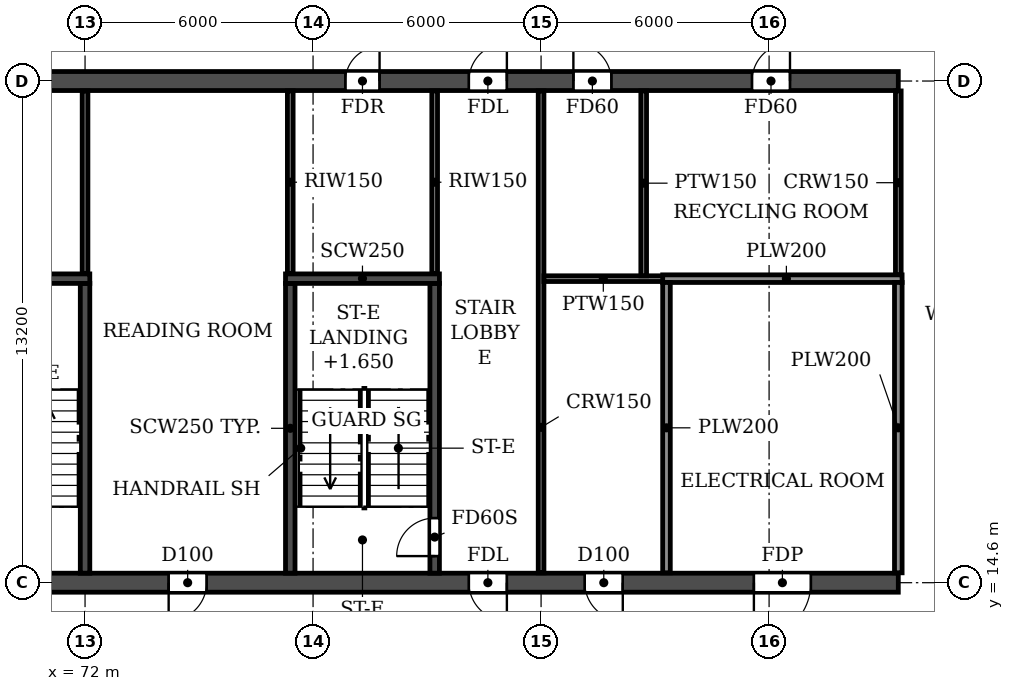
"""IFC4 building model, lengths in metres.
Left out: names, types, materials, properties, quantities, classifications, styles, units other than length and angle.
Written with IfcOpenShell. Run it as: python <this file> out.ifc"""

import sys

from ifc_helpers import new_model, si_unit, direction, frame, frame_2d, origin, place, context, subcontext, project, spatial, rectangle, extrude, element, fill, save


model = new_model("IFC4")
c1 = context("Model", 3, precision=1e-05, world=origin(), true_north=direction((0.0, 1.0)))
c2 = subcontext(c1, "Body", "Model", "MODEL_VIEW")
j1 = project(units=[si_unit("LENGTHUNIT", "METRE"), si_unit("PLANEANGLEUNIT", "RADIAN")], contexts=[c1])
p1 = place(None, origin())
s1 = spatial("IfcSite", under=j1, at=p1, CompositionType="ELEMENT")
p2 = place(p1, origin())
s2 = spatial("IfcBuilding", under=s1, at=p2, CompositionType="ELEMENT")
p3 = place(p2, frame((0.0, 0.0, 76.2)))
s3 = spatial("IfcBuildingStorey", under=s2, at=p3, CompositionType="ELEMENT", Elevation=76.2)
p4 = place(p3, frame((8.6, 14.6, 0.0), z_axis=(0.0, 0.0, 1.0), x_axis=(1.0, 0.0, 0.0)))
e1 = element("IfcWall", 1, at=p4, inside=s3, PredefinedType="SOLIDWALL", context=c2, shape_type="SweptSolid", body=[
    extrude(rectangle(XDim=84.8, YDim=0.5, at=frame_2d((42.4, 0.0))), origin(), (0.0, 0.0, 1.0), 3.06),
])
p5 = place(p4, frame((2.25, 0.0, 0.0)))
e2 = element("IfcOpeningElement", 2, at=p5, cuts=e1, PredefinedType="OPENING", context=c2, shape_type="SweptSolid", body=[
    extrude(rectangle(XDim=1.0, YDim=2.1, at=frame_2d((0.5, 1.05))), frame((0.0, 0.26, 0.0), z_axis=(0.0, -1.0, 0.0), x_axis=(1.0, 0.0, 0.0)), (0.0, 0.0, 1.0), 0.52),
])
p6 = place(p4, frame((6.95, 0.0, 0.0)))
e3 = element("IfcOpeningElement", 3, at=p6, cuts=e1, PredefinedType="OPENING", context=c2, shape_type="SweptSolid", body=[
    extrude(rectangle(XDim=1.0, YDim=2.1, at=frame_2d((0.5, 1.05))), frame((0.0, 0.26, 0.0), z_axis=(0.0, -1.0, 0.0), x_axis=(1.0, 0.0, 0.0)), (0.0, 0.0, 1.0), 0.52),
])
p7 = place(p4, frame((10.3, 0.0, 0.0)))
e4 = element("IfcOpeningElement", 4, at=p7, cuts=e1, PredefinedType="OPENING", context=c2, shape_type="SweptSolid", body=[
    extrude(rectangle(XDim=1.0, YDim=2.1, at=frame_2d((0.5, 1.05))), frame((0.0, 0.26, 0.0), z_axis=(0.0, -1.0, 0.0), x_axis=(1.0, 0.0, 0.0)), (0.0, 0.0, 1.0), 0.52),
])
p8 = place(p4, frame((18.2, 0.0, 0.0)))
e5 = element("IfcOpeningElement", 5, at=p8, cuts=e1, PredefinedType="OPENING", context=c2, shape_type="SweptSolid", body=[
    extrude(rectangle(XDim=1.0, YDim=2.1, at=frame_2d((0.5, 1.05))), frame((0.0, 0.26, 0.0), z_axis=(0.0, -1.0, 0.0), x_axis=(1.0, 0.0, 0.0)), (0.0, 0.0, 1.0), 0.52),
])
p9 = place(p4, frame((22.8, 0.0, 0.0)))
e6 = element("IfcOpeningElement", 6, at=p9, cuts=e1, PredefinedType="OPENING", context=c2, shape_type="SweptSolid", body=[
    extrude(rectangle(XDim=1.0, YDim=2.1, at=frame_2d((0.5, 1.05))), frame((0.0, 0.26, 0.0), z_axis=(0.0, -1.0, 0.0), x_axis=(1.0, 0.0, 0.0)), (0.0, 0.0, 1.0), 0.52),
])
p10 = place(p4, frame((35.4, 0.0, 0.0)))
e7 = element("IfcOpeningElement", 7, at=p10, cuts=e1, PredefinedType="OPENING", context=c2, shape_type="SweptSolid", body=[
    extrude(rectangle(XDim=1.0, YDim=2.1, at=frame_2d((0.5, 1.05))), frame((0.0, 0.26, 0.0), z_axis=(0.0, -1.0, 0.0), x_axis=(1.0, 0.0, 0.0)), (0.0, 0.0, 1.0), 0.52),
])
p11 = place(p4, frame((39.3, 0.0, 0.0)))
e8 = element("IfcOpeningElement", 8, at=p11, cuts=e1, PredefinedType="OPENING", context=c2, shape_type="SweptSolid", body=[
    extrude(rectangle(XDim=1.0, YDim=2.1, at=frame_2d((0.5, 1.05))), frame((0.0, 0.26, 0.0), z_axis=(0.0, -1.0, 0.0), x_axis=(1.0, 0.0, 0.0)), (0.0, 0.0, 1.0), 0.52),
])
p12 = place(p4, frame((41.9, 0.0, 0.0)))
e9 = element("IfcOpeningElement", 9, at=p12, cuts=e1, PredefinedType="OPENING", context=c2, shape_type="SweptSolid", body=[
    extrude(rectangle(XDim=1.0, YDim=2.1, at=frame_2d((0.5, 1.05))), frame((0.0, 0.26, 0.0), z_axis=(0.0, -1.0, 0.0), x_axis=(1.0, 0.0, 0.0)), (0.0, 0.0, 1.0), 0.52),
])
p13 = place(p4, frame((44.5, 0.0, 0.0)))
e10 = element("IfcOpeningElement", 10, at=p13, cuts=e1, PredefinedType="OPENING", context=c2, shape_type="SweptSolid", body=[
    extrude(rectangle(XDim=1.0, YDim=2.1, at=frame_2d((0.5, 1.05))), frame((0.0, 0.26, 0.0), z_axis=(0.0, -1.0, 0.0), x_axis=(1.0, 0.0, 0.0)), (0.0, 0.0, 1.0), 0.52),
])
p14 = place(p4, frame((48.4, 0.0, 0.0)))
e11 = element("IfcOpeningElement", 11, at=p14, cuts=e1, PredefinedType="OPENING", context=c2, shape_type="SweptSolid", body=[
    extrude(rectangle(XDim=1.0, YDim=2.1, at=frame_2d((0.5, 1.05))), frame((0.0, 0.26, 0.0), z_axis=(0.0, -1.0, 0.0), x_axis=(1.0, 0.0, 0.0)), (0.0, 0.0, 1.0), 0.52),
])
p15 = place(p4, frame((61.0, 0.0, 0.0)))
e12 = element("IfcOpeningElement", 12, at=p15, cuts=e1, PredefinedType="OPENING", context=c2, shape_type="SweptSolid", body=[
    extrude(rectangle(XDim=1.0, YDim=2.1, at=frame_2d((0.5, 1.05))), frame((0.0, 0.26, 0.0), z_axis=(0.0, -1.0, 0.0), x_axis=(1.0, 0.0, 0.0)), (0.0, 0.0, 1.0), 0.52),
])
p16 = place(p4, frame((65.6, 0.0, 0.0)))
e13 = element("IfcOpeningElement", 13, at=p16, cuts=e1, PredefinedType="OPENING", context=c2, shape_type="SweptSolid", body=[
    extrude(rectangle(XDim=1.0, YDim=2.1, at=frame_2d((0.5, 1.05))), frame((0.0, 0.26, 0.0), z_axis=(0.0, -1.0, 0.0), x_axis=(1.0, 0.0, 0.0)), (0.0, 0.0, 1.0), 0.52),
])
p17 = place(p4, frame((73.5, 0.0, 0.0)))
e14 = element("IfcOpeningElement", 14, at=p17, cuts=e1, PredefinedType="OPENING", context=c2, shape_type="SweptSolid", body=[
    extrude(rectangle(XDim=1.0, YDim=2.1, at=frame_2d((0.5, 1.05))), frame((0.0, 0.26, 0.0), z_axis=(0.0, -1.0, 0.0), x_axis=(1.0, 0.0, 0.0)), (0.0, 0.0, 1.0), 0.52),
])
p18 = place(p4, frame((76.55, 0.0, 0.0)))
e15 = element("IfcOpeningElement", 15, at=p18, cuts=e1, PredefinedType="OPENING", context=c2, shape_type="SweptSolid", body=[
    extrude(rectangle(XDim=1.0, YDim=2.1, at=frame_2d((0.5, 1.05))), frame((0.0, 0.26, 0.0), z_axis=(0.0, -1.0, 0.0), x_axis=(1.0, 0.0, 0.0)), (0.0, 0.0, 1.0), 0.52),
])
p19 = place(p4, frame((81.0, 0.0, 0.0)))
e16 = element("IfcOpeningElement", 16, at=p19, cuts=e1, PredefinedType="OPENING", context=c2, shape_type="SweptSolid", body=[
    extrude(rectangle(XDim=1.5, YDim=2.1, at=frame_2d((0.75, 1.05))), frame((0.0, 0.26, 0.0), z_axis=(0.0, -1.0, 0.0), x_axis=(1.0, 0.0, 0.0)), (0.0, 0.0, 1.0), 0.52),
])
p20 = place(p3, frame((8.6, 27.8, 0.0), z_axis=(0.0, 0.0, 1.0), x_axis=(1.0, 0.0, 0.0)))
e17 = element("IfcWall", 17, at=p20, inside=s3, PredefinedType="SOLIDWALL", context=c2, shape_type="SweptSolid", body=[
    extrude(rectangle(XDim=84.8, YDim=0.5, at=frame_2d((42.4, 0.0))), origin(), (0.0, 0.0, 1.0), 3.06),
])
p21 = place(p20, frame((2.0, 0.0, 0.0)))
e18 = element("IfcOpeningElement", 18, at=p21, cuts=e17, PredefinedType="OPENING", context=c2, shape_type="SweptSolid", body=[
    extrude(rectangle(XDim=1.5, YDim=2.1, at=frame_2d((0.75, 1.05))), frame((0.0, 0.26, 0.0), z_axis=(0.0, -1.0, 0.0), x_axis=(1.0, 0.0, 0.0)), (0.0, 0.0, 1.0), 0.52),
])
p22 = place(p20, frame((6.95, 0.0, 0.0)))
e19 = element("IfcOpeningElement", 19, at=p22, cuts=e17, PredefinedType="OPENING", context=c2, shape_type="SweptSolid", body=[
    extrude(rectangle(XDim=1.0, YDim=2.1, at=frame_2d((0.5, 1.05))), frame((0.0, 0.26, 0.0), z_axis=(0.0, -1.0, 0.0), x_axis=(1.0, 0.0, 0.0)), (0.0, 0.0, 1.0), 0.52),
])
p23 = place(p20, frame((10.3, 0.0, 0.0)))
e20 = element("IfcOpeningElement", 20, at=p23, cuts=e17, PredefinedType="OPENING", context=c2, shape_type="SweptSolid", body=[
    extrude(rectangle(XDim=1.0, YDim=2.1, at=frame_2d((0.5, 1.05))), frame((0.0, 0.26, 0.0), z_axis=(0.0, -1.0, 0.0), x_axis=(1.0, 0.0, 0.0)), (0.0, 0.0, 1.0), 0.52),
])
p24 = place(p20, frame((13.65, 0.0, 0.0)))
e21 = element("IfcOpeningElement", 21, at=p24, cuts=e17, PredefinedType="OPENING", context=c2, shape_type="SweptSolid", body=[
    extrude(rectangle(XDim=0.9, YDim=2.1, at=frame_2d((0.45, 1.05))), frame((0.0, 0.26, 0.0), z_axis=(0.0, -1.0, 0.0), x_axis=(1.0, 0.0, 0.0)), (0.0, 0.0, 1.0), 0.52),
])
p25 = place(p20, frame((22.85, 0.0, 0.0)))
e22 = element("IfcOpeningElement", 22, at=p25, cuts=e17, PredefinedType="OPENING", context=c2, shape_type="SweptSolid", body=[
    extrude(rectangle(XDim=0.9, YDim=2.1, at=frame_2d((0.45, 1.05))), frame((0.0, 0.26, 0.0), z_axis=(0.0, -1.0, 0.0), x_axis=(1.0, 0.0, 0.0)), (0.0, 0.0, 1.0), 0.52),
])
p26 = place(p20, frame((26.0, 0.0, 0.0)))
e23 = element("IfcOpeningElement", 23, at=p26, cuts=e17, PredefinedType="OPENING", context=c2, shape_type="SweptSolid", body=[
    extrude(rectangle(XDim=1.0, YDim=2.1, at=frame_2d((0.5, 1.05))), frame((0.0, 0.26, 0.0), z_axis=(0.0, -1.0, 0.0), x_axis=(1.0, 0.0, 0.0)), (0.0, 0.0, 1.0), 0.52),
])
p27 = place(p20, frame((31.2, 0.0, 0.0)))
e24 = element("IfcOpeningElement", 24, at=p27, cuts=e17, PredefinedType="OPENING", context=c2, shape_type="SweptSolid", body=[
    extrude(rectangle(XDim=1.0, YDim=2.1, at=frame_2d((0.5, 1.05))), frame((0.0, 0.26, 0.0), z_axis=(0.0, -1.0, 0.0), x_axis=(1.0, 0.0, 0.0)), (0.0, 0.0, 1.0), 0.52),
])
p28 = place(p20, frame((39.0, 0.0, 0.0)))
e25 = element("IfcOpeningElement", 25, at=p28, cuts=e17, PredefinedType="OPENING", context=c2, shape_type="SweptSolid", body=[
    extrude(rectangle(XDim=1.0, YDim=2.1, at=frame_2d((0.5, 1.05))), frame((0.0, 0.26, 0.0), z_axis=(0.0, -1.0, 0.0), x_axis=(1.0, 0.0, 0.0)), (0.0, 0.0, 1.0), 0.52),
])
p29 = place(p20, frame((41.9, 0.0, 0.0)))
e26 = element("IfcOpeningElement", 26, at=p29, cuts=e17, PredefinedType="OPENING", context=c2, shape_type="SweptSolid", body=[
    extrude(rectangle(XDim=1.0, YDim=2.1, at=frame_2d((0.5, 1.05))), frame((0.0, 0.26, 0.0), z_axis=(0.0, -1.0, 0.0), x_axis=(1.0, 0.0, 0.0)), (0.0, 0.0, 1.0), 0.52),
])
p30 = place(p20, frame((44.8, 0.0, 0.0)))
e27 = element("IfcOpeningElement", 27, at=p30, cuts=e17, PredefinedType="OPENING", context=c2, shape_type="SweptSolid", body=[
    extrude(rectangle(XDim=1.0, YDim=2.1, at=frame_2d((0.5, 1.05))), frame((0.0, 0.26, 0.0), z_axis=(0.0, -1.0, 0.0), x_axis=(1.0, 0.0, 0.0)), (0.0, 0.0, 1.0), 0.52),
])
p31 = place(p20, frame((48.7, 0.0, 0.0)))
e28 = element("IfcOpeningElement", 28, at=p31, cuts=e17, PredefinedType="OPENING", context=c2, shape_type="SweptSolid", body=[
    extrude(rectangle(XDim=1.0, YDim=2.1, at=frame_2d((0.5, 1.05))), frame((0.0, 0.26, 0.0), z_axis=(0.0, -1.0, 0.0), x_axis=(1.0, 0.0, 0.0)), (0.0, 0.0, 1.0), 0.52),
])
p32 = place(p20, frame((55.2, 0.0, 0.0)))
e29 = element("IfcOpeningElement", 29, at=p32, cuts=e17, PredefinedType="OPENING", context=c2, shape_type="SweptSolid", body=[
    extrude(rectangle(XDim=1.0, YDim=2.1, at=frame_2d((0.5, 1.05))), frame((0.0, 0.26, 0.0), z_axis=(0.0, -1.0, 0.0), x_axis=(1.0, 0.0, 0.0)), (0.0, 0.0, 1.0), 0.52),
])
p33 = place(p20, frame((61.05, 0.0, 0.0)))
e30 = element("IfcOpeningElement", 30, at=p33, cuts=e17, PredefinedType="OPENING", context=c2, shape_type="SweptSolid", body=[
    extrude(rectangle(XDim=0.9, YDim=2.1, at=frame_2d((0.45, 1.05))), frame((0.0, 0.26, 0.0), z_axis=(0.0, -1.0, 0.0), x_axis=(1.0, 0.0, 0.0)), (0.0, 0.0, 1.0), 0.52),
])
p34 = place(p20, frame((70.25, 0.0, 0.0)))
e31 = element("IfcOpeningElement", 31, at=p34, cuts=e17, PredefinedType="OPENING", context=c2, shape_type="SweptSolid", body=[
    extrude(rectangle(XDim=0.9, YDim=2.1, at=frame_2d((0.45, 1.05))), frame((0.0, 0.26, 0.0), z_axis=(0.0, -1.0, 0.0), x_axis=(1.0, 0.0, 0.0)), (0.0, 0.0, 1.0), 0.52),
])
p35 = place(p20, frame((73.5, 0.0, 0.0)))
e32 = element("IfcOpeningElement", 32, at=p35, cuts=e17, PredefinedType="OPENING", context=c2, shape_type="SweptSolid", body=[
    extrude(rectangle(XDim=1.0, YDim=2.1, at=frame_2d((0.5, 1.05))), frame((0.0, 0.26, 0.0), z_axis=(0.0, -1.0, 0.0), x_axis=(1.0, 0.0, 0.0)), (0.0, 0.0, 1.0), 0.52),
])
p36 = place(p20, frame((76.25, 0.0, 0.0)))
e33 = element("IfcOpeningElement", 33, at=p36, cuts=e17, PredefinedType="OPENING", context=c2, shape_type="SweptSolid", body=[
    extrude(rectangle(XDim=1.0, YDim=2.1, at=frame_2d((0.5, 1.05))), frame((0.0, 0.26, 0.0), z_axis=(0.0, -1.0, 0.0), x_axis=(1.0, 0.0, 0.0)), (0.0, 0.0, 1.0), 0.52),
])
p37 = place(p20, frame((80.95, 0.0, 0.0)))
e34 = element("IfcOpeningElement", 34, at=p37, cuts=e17, PredefinedType="OPENING", context=c2, shape_type="SweptSolid", body=[
    extrude(rectangle(XDim=1.0, YDim=2.1, at=frame_2d((0.5, 1.05))), frame((0.0, 0.26, 0.0), z_axis=(0.0, -1.0, 0.0), x_axis=(1.0, 0.0, 0.0)), (0.0, 0.0, 1.0), 0.52),
])
p38 = place(p3, frame((72.0, 14.85, 0.0), z_axis=(0.0, 0.0, 1.0), x_axis=(0.0, 1.0, 0.0)))
e35 = element("IfcWall", 35, at=p38, inside=s3, PredefinedType="SOLIDWALL", context=c2, shape_type="SweptSolid", body=[
    extrude(rectangle(XDim=7.625, YDim=0.25, at=frame_2d((3.812, 0.0))), origin(), (0.0, 0.0, 1.0), 3.06),
])
p39 = place(p3, frame((68.075, 22.6, 0.0), z_axis=(0.0, 0.0, 1.0), x_axis=(1.0, 0.0, 0.0)))
e36 = element("IfcWall", 36, at=p39, inside=s3, PredefinedType="SOLIDWALL", context=c2, shape_type="SweptSolid", body=[
    extrude(rectangle(XDim=4.05, YDim=0.25, at=frame_2d((2.025, 0.0))), origin(), (0.0, 0.0, 1.0), 3.06),
])
p40 = place(p3, frame((77.4, 14.85, 0.0), z_axis=(0.0, 0.0, 1.0), x_axis=(0.0, 1.0, 0.0)))
e37 = element("IfcWall", 37, at=p40, inside=s3, PredefinedType="SOLIDWALL", context=c2, shape_type="SweptSolid", body=[
    extrude(rectangle(XDim=7.625, YDim=0.25, at=frame_2d((3.812, 0.0))), origin(), (0.0, 0.0, 1.0), 3.06),
])
p41 = place(p3, frame((81.2, 14.85, 0.0), z_axis=(0.0, 0.0, 1.0), x_axis=(0.0, 1.0, 0.0)))
e38 = element("IfcWall", 38, at=p41, inside=s3, PredefinedType="SOLIDWALL", context=c2, shape_type="SweptSolid", body=[
    extrude(rectangle(XDim=7.625, YDim=0.25, at=frame_2d((3.812, 0.0))), origin(), (0.0, 0.0, 1.0), 3.06),
])
p42 = place(p41, frame((0.45, 0.0, 0.0)))
e39 = element("IfcOpeningElement", 39, at=p42, cuts=e38, PredefinedType="OPENING", context=c2, shape_type="SweptSolid", body=[
    extrude(rectangle(XDim=1.0, YDim=2.1, at=frame_2d((0.5, 1.05))), frame((0.0, 0.135, 0.0), z_axis=(0.0, -1.0, 0.0), x_axis=(1.0, 0.0, 0.0)), (0.0, 0.0, 1.0), 0.27),
])
p43 = place(p3, frame((77.275, 22.6, 0.0), z_axis=(0.0, 0.0, 1.0), x_axis=(1.0, 0.0, 0.0)))
e40 = element("IfcWall", 40, at=p43, inside=s3, PredefinedType="SOLIDWALL", context=c2, shape_type="SweptSolid", body=[
    extrude(rectangle(XDim=4.05, YDim=0.25, at=frame_2d((2.025, 0.0))), origin(), (0.0, 0.0, 1.0), 3.06),
])
p44 = place(p3, frame((84.0, 14.86, 0.0), z_axis=(0.0, 0.0, 1.0), x_axis=(0.0, 1.0, 0.0)))
e41 = element("IfcWall", 41, at=p44, inside=s3, PredefinedType="PARTITIONING", context=c2, shape_type="SweptSolid", body=[
    extrude(rectangle(XDim=12.68, YDim=0.15, at=frame_2d((6.34, 0.0))), origin(), (0.0, 0.0, 1.0), 3.06),
])
p45 = place(p3, frame((93.4, 22.7, 0.0), z_axis=(0.0, 0.0, 1.0), x_axis=(0.0, 1.0, 0.0)))
e42 = element("IfcWall", 42, at=p45, inside=s3, PredefinedType="PARTITIONING", context=c2, shape_type="SweptSolid", body=[
    extrude(rectangle(XDim=4.84, YDim=0.15, at=frame_2d((2.42, 0.0))), origin(), (0.0, 0.0, 1.0), 3.06),
])
p46 = place(p3, frame((84.075, 22.6, 0.0), z_axis=(0.0, 0.0, 1.0), x_axis=(1.0, 0.0, 0.0)))
e43 = element("IfcWall", 43, at=p46, inside=s3, PredefinedType="PARTITIONING", context=c2, shape_type="SweptSolid", body=[
    extrude(rectangle(XDim=3.325, YDim=0.15, at=frame_2d((1.663, 0.0))), origin(), (0.0, 0.0, 1.0), 3.06),
])
p47 = place(p3, frame((86.7, 22.675, 0.0), z_axis=(0.0, 0.0, 1.0), x_axis=(0.0, 1.0, 0.0)))
e44 = element("IfcWall", 44, at=p47, inside=s3, PredefinedType="PARTITIONING", context=c2, shape_type="SweptSolid", body=[
    extrude(rectangle(XDim=4.865, YDim=0.15, at=frame_2d((2.433, 0.0))), origin(), (0.0, 0.0, 1.0), 3.06),
])
p48 = place(p3, frame((87.2, 22.6, 0.0), z_axis=(0.0, 0.0, 1.0), x_axis=(1.0, 0.0, 0.0)))
e45 = element("IfcWall", 45, at=p48, inside=s3, PredefinedType="PARTITIONING", context=c2, shape_type="SweptSolid", body=[
    extrude(rectangle(XDim=6.3, YDim=0.2, at=frame_2d((3.15, 0.0))), origin(), (0.0, 0.0, 1.0), 3.06),
])
for number, where, z_axis, x_axis in (
    (46, (87.3, 14.86, 0.0), (0.0, 0.0, 1.0), (0.0, 1.0, 0.0)),
    (47, (93.4, 14.86, 0.0), (0.0, 0.0, 1.0), (0.0, 1.0, 0.0)),
):
    element("IfcWall", number, at=place(p3, frame(where, z_axis=z_axis, x_axis=x_axis)), inside=s3, PredefinedType="PARTITIONING", context=c2, shape_type="SweptSolid", body=[
        extrude(rectangle(XDim=7.64, YDim=0.2, at=frame_2d((3.82, 0.0))), origin(), (0.0, 0.0, 1.0), 3.06),
    ])
for number, where, z_axis, x_axis in (
    (48, (72.0, 22.735, 0.0), (0.0, 0.0, 1.0), (0.0, 1.0, 0.0)),
    (49, (77.4, 22.735, 0.0), (0.0, 0.0, 1.0), (0.0, 1.0, 0.0)),
    (50, (81.2, 22.735, 0.0), (0.0, 0.0, 1.0), (0.0, 1.0, 0.0)),
):
    element("IfcWall", number, at=place(p3, frame(where, z_axis=z_axis, x_axis=x_axis)), inside=s3, PredefinedType="PARTITIONING", context=c2, shape_type="SweptSolid", body=[
        extrude(rectangle(XDim=4.805, YDim=0.15, at=frame_2d((2.402, 0.0))), origin(), (0.0, 0.0, 1.0), 3.06),
    ])
p49 = place(p34, origin())
e51 = element("IfcDoor", 51, at=p49, inside=s3, OperationType="SINGLE_SWING_RIGHT", PredefinedType="DOOR", context=c2, shape_type="SweptSolid", body=[
    extrude(rectangle(XDim=0.9, YDim=2.1, at=frame_2d((0.45, 1.05))), frame((0.0, 0.025, 0.0), z_axis=(0.0, -1.0, 0.0), x_axis=(1.0, 0.0, 0.0)), (0.0, 0.0, 1.0), 0.05),
])
fill(e31, e51)
p50 = place(p35, origin())
e52 = element("IfcDoor", 52, at=p50, inside=s3, OperationType="SINGLE_SWING_RIGHT", PredefinedType="DOOR", context=c2, shape_type="SweptSolid", body=[
    extrude(rectangle(XDim=1.0, YDim=2.1, at=frame_2d((0.5, 1.05))), frame((0.0, 0.025, 0.0), z_axis=(0.0, -1.0, 0.0), x_axis=(1.0, 0.0, 0.0)), (0.0, 0.0, 1.0), 0.05),
])
fill(e32, e52)
p51 = place(p36, origin())
e53 = element("IfcDoor", 53, at=p51, inside=s3, OperationType="SINGLE_SWING_LEFT", PredefinedType="DOOR", context=c2, shape_type="SweptSolid", body=[
    extrude(rectangle(XDim=1.0, YDim=2.1, at=frame_2d((0.5, 1.05))), frame((0.0, 0.025, 0.0), z_axis=(0.0, -1.0, 0.0), x_axis=(1.0, 0.0, 0.0)), (0.0, 0.0, 1.0), 0.05),
])
fill(e33, e53)
p52 = place(p37, origin())
e54 = element("IfcDoor", 54, at=p52, inside=s3, OperationType="SINGLE_SWING_RIGHT", PredefinedType="DOOR", context=c2, shape_type="SweptSolid", body=[
    extrude(rectangle(XDim=1.0, YDim=2.1, at=frame_2d((0.5, 1.05))), frame((0.0, 0.025, 0.0), z_axis=(0.0, -1.0, 0.0), x_axis=(1.0, 0.0, 0.0)), (0.0, 0.0, 1.0), 0.05),
])
fill(e34, e54)
p53 = place(p16, frame((1.0, 0.0, 0.0), z_axis=(0.0, 0.0, 1.0), x_axis=(-1.0, 0.0, 0.0)))
e55 = element("IfcDoor", 55, at=p53, inside=s3, OperationType="SINGLE_SWING_RIGHT", PredefinedType="DOOR", context=c2, shape_type="SweptSolid", body=[
    extrude(rectangle(XDim=1.0, YDim=2.1, at=frame_2d((0.5, 1.05))), frame((0.0, 0.025, 0.0), z_axis=(0.0, -1.0, 0.0), x_axis=(1.0, 0.0, 0.0)), (0.0, 0.0, 1.0), 0.05),
])
fill(e13, e55)
p54 = place(p17, frame((1.0, 0.0, 0.0), z_axis=(0.0, 0.0, 1.0), x_axis=(-1.0, 0.0, 0.0)))
e56 = element("IfcDoor", 56, at=p54, inside=s3, OperationType="SINGLE_SWING_LEFT", PredefinedType="DOOR", context=c2, shape_type="SweptSolid", body=[
    extrude(rectangle(XDim=1.0, YDim=2.1, at=frame_2d((0.5, 1.05))), frame((0.0, 0.025, 0.0), z_axis=(0.0, -1.0, 0.0), x_axis=(1.0, 0.0, 0.0)), (0.0, 0.0, 1.0), 0.05),
])
fill(e14, e56)
p55 = place(p18, frame((1.0, 0.0, 0.0), z_axis=(0.0, 0.0, 1.0), x_axis=(-1.0, 0.0, 0.0)))
e57 = element("IfcDoor", 57, at=p55, inside=s3, OperationType="SINGLE_SWING_LEFT", PredefinedType="DOOR", context=c2, shape_type="SweptSolid", body=[
    extrude(rectangle(XDim=1.0, YDim=2.1, at=frame_2d((0.5, 1.05))), frame((0.0, 0.025, 0.0), z_axis=(0.0, -1.0, 0.0), x_axis=(1.0, 0.0, 0.0)), (0.0, 0.0, 1.0), 0.05),
])
fill(e15, e57)
p56 = place(p19, frame((1.5, 0.0, 0.0), z_axis=(0.0, 0.0, 1.0), x_axis=(-1.0, 0.0, 0.0)))
e58 = element("IfcDoor", 58, at=p56, inside=s3, OperationType="DOUBLE_DOOR_SINGLE_SWING", PredefinedType="DOOR", context=c2, shape_type="SweptSolid", body=[
    extrude(rectangle(XDim=1.5, YDim=2.1, at=frame_2d((0.75, 1.05))), frame((0.0, 0.025, 0.0), z_axis=(0.0, -1.0, 0.0), x_axis=(1.0, 0.0, 0.0)), (0.0, 0.0, 1.0), 0.05),
])
fill(e16, e58)
p57 = place(p42, origin())
e59 = element("IfcDoor", 59, at=p57, inside=s3, OperationType="SINGLE_SWING_LEFT", PredefinedType="DOOR", context=c2, shape_type="SweptSolid", body=[
    extrude(rectangle(XDim=1.0, YDim=2.1, at=frame_2d((0.5, 1.05))), frame((0.0, 0.025, 0.0), z_axis=(0.0, -1.0, 0.0), x_axis=(1.0, 0.0, 0.0)), (0.0, 0.0, 1.0), 0.05),
])
fill(e39, e59)
save(model, sys.argv[1])
